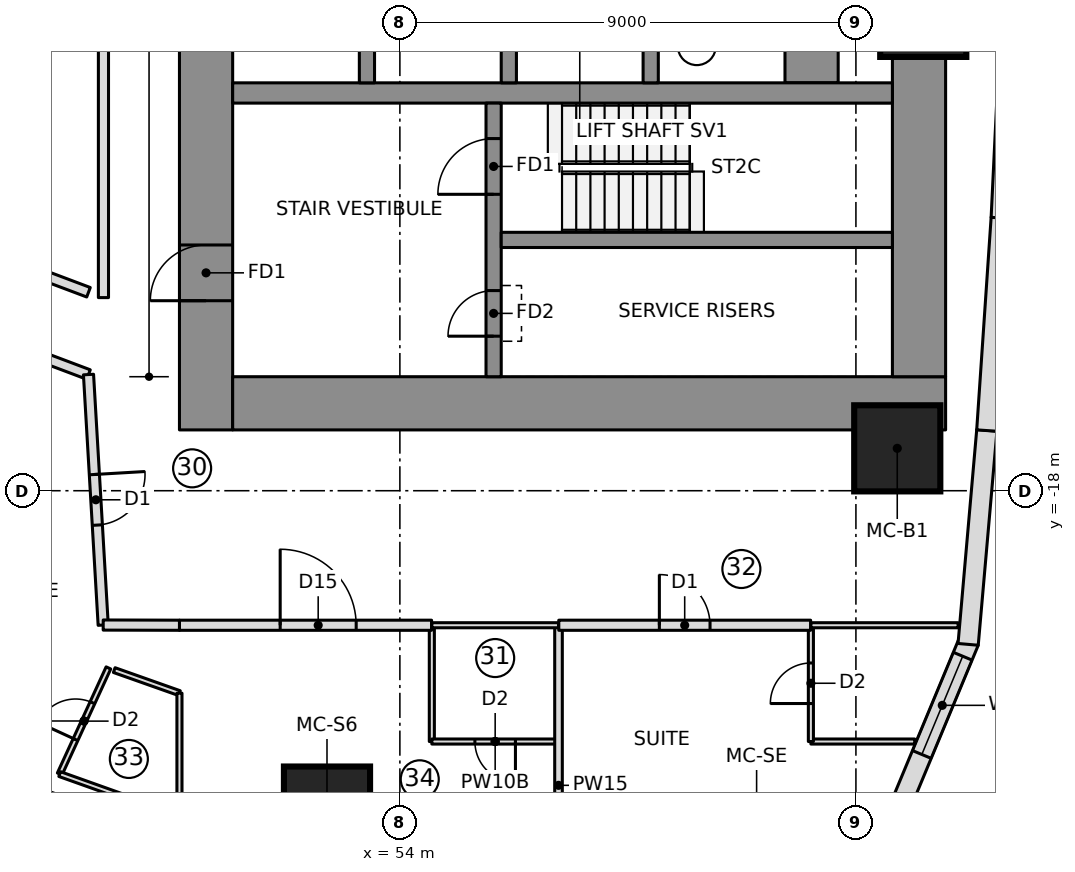
"""IFC4 building model, lengths in metres.
Left out: names, types, materials, properties, quantities, classifications, styles, units other than length and angle.
Written with IfcOpenShell. Run it as: python <this file> out.ifc"""

import sys

from ifc_helpers import new_model, si_unit, direction, frame, frame_2d, origin, origin_2d, place, context, subcontext, project, spatial, polyline, rectangle, outline, extrude, element, fill, save


model = new_model("IFC4")
c1 = context("Model", 3, precision=1e-05, world=origin(), true_north=direction((0.0, 1.0)))
c2 = subcontext(c1, "Body", "Model", "MODEL_VIEW")
j1 = project(units=[si_unit("LENGTHUNIT", "METRE"), si_unit("PLANEANGLEUNIT", "RADIAN")], contexts=[c1])
p1 = place(None, origin())
s1 = spatial("IfcSite", under=j1, at=p1, CompositionType="ELEMENT")
p2 = place(p1, origin())
s2 = spatial("IfcBuilding", under=s1, at=p2, CompositionType="ELEMENT")
p3 = place(p2, frame((0.0, 0.0, 113.3)))
s3 = spatial("IfcBuildingStorey", under=s2, at=p3, CompositionType="ELEMENT", Elevation=113.3)
p4 = place(p3, frame((50.175, -16.8, 0.0), z_axis=(0.0, 0.0, 1.0), x_axis=(0.0, 1.0, 0.0)))
e1 = element("IfcWall", 1, at=p4, inside=s3, PredefinedType="SHEAR", context=c2, shape_type="SweptSolid", body=[
    extrude(rectangle(XDim=10.15, YDim=1.05, at=frame_2d((5.075, 0.0))), origin(), (0.0, 0.0, 1.0), 3.55),
])
p5 = place(p4, frame((2.55, 0.0, 0.0)))
e2 = element("IfcOpeningElement", 2, at=p5, cuts=e1, PredefinedType="OPENING", context=c2, shape_type="SweptSolid", body=[
    extrude(rectangle(XDim=1.1, YDim=2.1, at=frame_2d((0.55, 1.05))), frame((0.0, 0.535, 0.0), z_axis=(0.0, -1.0, 0.0), x_axis=(1.0, 0.0, 0.0)), (0.0, 0.0, 1.0), 1.07),
])
p6 = place(p3, frame((50.7, -16.275, 0.0), z_axis=(0.0, 0.0, 1.0), x_axis=(1.0, 0.0, 0.0)))
e3 = element("IfcWall", 3, at=p6, inside=s3, PredefinedType="SHEAR", context=c2, shape_type="SweptSolid", body=[
    extrude(rectangle(XDim=14.07, YDim=1.05, at=frame_2d((7.035, 0.0))), origin(), (0.0, 0.0, 1.0), 3.55),
])
p7 = place(p3, frame((64.245, -15.75, 0.0), z_axis=(0.0, 0.0, 1.0), x_axis=(0.0, 1.0, 0.0)))
e4 = element("IfcWall", 4, at=p7, inside=s3, PredefinedType="SHEAR", context=c2, shape_type="SweptSolid", body=[
    extrude(rectangle(XDim=6.361, YDim=1.05, at=frame_2d((3.181, 0.0))), origin(), (0.0, 0.0, 1.0), 3.55),
])
p8 = place(p3, frame((62.125, -9.95, 0.0), z_axis=(0.0, 0.0, 1.0), x_axis=(0.0, 1.0, 0.0)))
e5 = element("IfcWall", 5, at=p8, inside=s3, PredefinedType="SHEAR", context=c2, shape_type="SweptSolid", body=[
    extrude(rectangle(XDim=19.9, YDim=1.05, at=frame_2d((9.95, 0.0))), origin(), (0.0, 0.0, 1.0), 3.55),
])
p9 = place(p3, frame((50.7, -10.15, 0.0), z_axis=(0.0, 0.0, 1.0), x_axis=(1.0, 0.0, 0.0)))
e6 = element("IfcWall", 6, at=p9, inside=s3, PredefinedType="SHEAR", context=c2, shape_type="SweptSolid", body=[
    extrude(rectangle(XDim=13.02, YDim=0.4, at=frame_2d((6.51, 0.0))), origin(), (0.0, 0.0, 1.0), 3.55),
])
for number, where, z_axis, x_axis in (
    (7, (53.35, -9.95, 0.0), (0.0, 0.0, 1.0), (0.0, 1.0, 0.0)),
    (8, (56.15, -9.95, 0.0), (0.0, 0.0, 1.0), (0.0, 1.0, 0.0)),
    (9, (58.95, -9.95, 0.0), (0.0, 0.0, 1.0), (0.0, 1.0, 0.0)),
):
    element("IfcWall", number, at=place(p3, frame(where, z_axis=z_axis, x_axis=x_axis)), inside=s3, PredefinedType="SHEAR", context=c2, shape_type="SweptSolid", body=[
        extrude(rectangle(XDim=3.0, YDim=0.3, at=frame_2d((1.5, 0.0))), origin(), (0.0, 0.0, 1.0), 3.55),
    ])
p10 = place(p3, frame((55.85, -15.75, 0.0), z_axis=(0.0, 0.0, 1.0), x_axis=(0.0, 1.0, 0.0)))
e10 = element("IfcWall", 10, at=p10, inside=s3, PredefinedType="SHEAR", context=c2, shape_type="SweptSolid", body=[
    extrude(rectangle(XDim=5.4, YDim=0.3, at=frame_2d((2.7, 0.0))), origin(), (0.0, 0.0, 1.0), 3.55),
])
p11 = place(p10, frame((3.6, 0.0, 0.0)))
e11 = element("IfcOpeningElement", 11, at=p11, cuts=e10, PredefinedType="OPENING", context=c2, shape_type="SweptSolid", body=[
    extrude(rectangle(XDim=1.1, YDim=2.1, at=frame_2d((0.55, 1.05))), frame((0.0, 0.16, 0.0), z_axis=(0.0, -1.0, 0.0), x_axis=(1.0, 0.0, 0.0)), (0.0, 0.0, 1.0), 0.32),
])
p12 = place(p10, frame((0.8, 0.0, 0.0)))
e12 = element("IfcOpeningElement", 12, at=p12, cuts=e10, PredefinedType="OPENING", context=c2, shape_type="SweptSolid", body=[
    extrude(rectangle(XDim=0.9, YDim=2.1, at=frame_2d((0.45, 1.05))), frame((0.0, 0.16, 0.0), z_axis=(0.0, -1.0, 0.0), x_axis=(1.0, 0.0, 0.0)), (0.0, 0.0, 1.0), 0.32),
])
p13 = place(p3, frame((56.0, -13.05, 0.0), z_axis=(0.0, 0.0, 1.0), x_axis=(1.0, 0.0, 0.0)))
e13 = element("IfcWall", 13, at=p13, inside=s3, PredefinedType="SHEAR", context=c2, shape_type="SweptSolid", body=[
    extrude(rectangle(XDim=7.72, YDim=0.3, at=frame_2d((3.86, 0.0))), origin(), (0.0, 0.0, 1.0), 3.55),
])
for number, where, z_axis, x_axis in (
    (14, (52.562, -24.293, 0.0), (0.0, 0.0, 1.0), (1.0, 0.0, 0.0)),
    (15, (63.816, -17.164, 0.0), (0.0, 0.0, 1.0), (1.0, 0.0, 0.0)),
    (16, (64.329, -8.589, 0.0), (0.0, 0.0, 1.0), (1.0, 0.0, 0.0)),
):
    element("IfcColumn", number, at=place(p3, frame(where, z_axis=z_axis, x_axis=x_axis)), inside=s3, PredefinedType="COLUMN", context=c2, shape_type="SweptSolid", body=[
        extrude(rectangle(XDim=1.7, YDim=1.7, at=origin_2d()), origin(), (0.0, 0.0, 1.0), 3.55),
    ])
p14 = place(p3, frame((63.59, -24.916, 0.0), z_axis=(0.0, 0.0, 1.0), x_axis=(0.383997751971, 0.923334027577, 0.0)))
e17 = element("IfcWall", 17, at=p14, inside=s3, PredefinedType="NOTDEFINED", context=c2, shape_type="SweptSolid", body=[
    extrude(outline(polyline([(-0.061, -0.2), (4.27, -0.2), (4.208, 0.2), (0.061, 0.2), (-0.061, -0.2)])), origin(), (0.0, 0.0, 1.0), 3.25),
])
p15 = place(p14, frame((1.852, 0.0, 0.6)))
e18 = element("IfcOpeningElement", 18, at=p15, cuts=e17, PredefinedType="OPENING", context=c2, shape_type="SweptSolid", body=[
    extrude(outline(polyline([(0.0, 1.4), (0.08, 1.802), (0.308, 2.142), (0.648, 2.37), (1.05, 2.45), (1.452, 2.37), (1.792, 2.142), (2.02, 1.802), (2.1, 1.4), (2.1, 1.05), (2.02, 0.648), (1.792, 0.308), (1.452, 0.08), (1.05, 0.0), (0.648, 0.08), (0.308, 0.308), (0.08, 0.648), (0.0, 1.05), (0.0, 1.4)])), frame((0.0, 0.21, 0.0), z_axis=(0.0, -1.0, 0.0), x_axis=(1.0, 0.0, 0.0)), (0.0, 0.0, 1.0), 0.42),
])
p16 = place(p3, frame((65.217, -21.002, 0.0), z_axis=(0.0, 0.0, 1.0), x_axis=(0.086992730434, 0.996208946382, 0.0)))
e19 = element("IfcWall", 19, at=p16, inside=s3, PredefinedType="NOTDEFINED", context=c2, shape_type="SweptSolid", body=[
    extrude(outline(polyline([(-0.031, -0.2), (4.209, -0.2), (4.205, 0.2), (0.031, 0.2), (-0.031, -0.2)])), origin(), (0.0, 0.0, 1.0), 3.25),
])
p17 = place(p3, frame((65.583, -16.811, 0.0), z_axis=(0.0, 0.0, 1.0), x_axis=(0.067724559895, 0.997704056315, 0.0)))
e20 = element("IfcWall", 20, at=p17, inside=s3, PredefinedType="NOTDEFINED", context=c2, shape_type="SweptSolid", body=[
    extrude(outline(polyline([(-0.002, -0.2), (4.209, -0.2), (4.205, 0.2), (0.002, 0.2), (-0.002, -0.2)])), origin(), (0.0, 0.0, 1.0), 3.25),
])
p18 = place(p3, frame((65.868, -12.614, 0.0), z_axis=(0.0, 0.0, 1.0), x_axis=(0.048342691508, 0.998830808585, 0.0)))
e21 = element("IfcWall", 21, at=p18, inside=s3, PredefinedType="NOTDEFINED", context=c2, shape_type="SweptSolid", body=[
    extrude(outline(polyline([(-0.002, -0.2), (4.209, -0.2), (4.205, 0.2), (0.002, 0.2), (-0.002, -0.2)])), origin(), (0.0, 0.0, 1.0), 3.25),
])
p19 = place(p3, frame((54.631, -22.95, 0.0), z_axis=(0.0, 0.0, 1.0), x_axis=(0.0, 1.0, 0.0)))
e22 = element("IfcWall", 22, at=p19, inside=s3, PredefinedType="PARTITIONING", context=c2, shape_type="SweptSolid", body=[
    extrude(rectangle(XDim=2.3, YDim=0.1, at=frame_2d((1.15, 0.0))), origin(), (0.0, 0.0, 1.0), 3.25),
])
p20 = place(p3, frame((57.131, -22.95, 0.0), z_axis=(0.0, 0.0, 1.0), x_axis=(-1.0, 0.0, 0.0)))
e23 = element("IfcWall", 23, at=p20, inside=s3, PredefinedType="PARTITIONING", context=c2, shape_type="SweptSolid", body=[
    extrude(rectangle(XDim=2.5, YDim=0.1, at=frame_2d((1.25, 0.0))), origin(), (0.0, 0.0, 1.0), 3.25),
])
p21 = place(p20, frame((0.85, 0.0, 0.0)))
e24 = element("IfcOpeningElement", 24, at=p21, cuts=e23, PredefinedType="OPENING", context=c2, shape_type="SweptSolid", body=[
    extrude(rectangle(XDim=0.8, YDim=2.1, at=frame_2d((0.4, 1.05))), frame((0.0, 0.06, 0.0), z_axis=(0.0, -1.0, 0.0), x_axis=(1.0, 0.0, 0.0)), (0.0, 0.0, 1.0), 0.12),
])
p22 = place(p3, frame((64.16, -22.95, 0.0), z_axis=(0.0, 0.0, 1.0), x_axis=(-1.0, 0.0, 0.0)))
e25 = element("IfcWall", 25, at=p22, inside=s3, PredefinedType="PARTITIONING", context=c2, shape_type="SweptSolid", body=[
    extrude(rectangle(XDim=2.049, YDim=0.1, at=frame_2d((1.025, 0.0))), origin(), (0.0, 0.0, 1.0), 3.25),
])
p23 = place(p3, frame((62.111, -22.95, 0.0), z_axis=(0.0, 0.0, 1.0), x_axis=(0.0, 1.0, 0.0)))
e26 = element("IfcWall", 26, at=p23, inside=s3, PredefinedType="PARTITIONING", context=c2, shape_type="SweptSolid", body=[
    extrude(rectangle(XDim=2.3, YDim=0.1, at=frame_2d((1.15, 0.0))), origin(), (0.0, 0.0, 1.0), 3.25),
])
p24 = place(p23, frame((0.75, 0.0, 0.0)))
e27 = element("IfcOpeningElement", 27, at=p24, cuts=e26, PredefinedType="OPENING", context=c2, shape_type="SweptSolid", body=[
    extrude(rectangle(XDim=0.8, YDim=2.1, at=frame_2d((0.4, 1.05))), frame((0.0, 0.06, 0.0), z_axis=(0.0, -1.0, 0.0), x_axis=(1.0, 0.0, 0.0)), (0.0, 0.0, 1.0), 0.12),
])
p25 = place(p3, frame((57.131, -26.979, 0.0), z_axis=(0.0, 0.0, 1.0), x_axis=(0.0, 1.0, 0.0)))
e28 = element("IfcWall", 28, at=p25, inside=s3, PredefinedType="PARTITIONING", context=c2, shape_type="SweptSolid", body=[
    extrude(rectangle(XDim=6.329, YDim=0.15, at=frame_2d((3.165, 0.0))), origin(), (0.0, 0.0, 1.0), 3.25),
])
p26 = place(p3, frame((48.363, -21.54, 0.0), z_axis=(0.0, 0.0, 1.0), x_axis=(0.942692856107, -0.333661773425, 0.0)))
e29 = element("IfcWall", 29, at=p26, inside=s3, PredefinedType="PARTITIONING", context=c2, shape_type="SweptSolid", body=[
    extrude(rectangle(XDim=1.365, YDim=0.1, at=frame_2d((0.683, 0.0))), origin(), (0.0, 0.0, 1.0), 3.25),
])
p27 = place(p3, frame((47.286, -23.592, 0.0), z_axis=(0.0, 0.0, 1.0), x_axis=(0.41749308293, 0.908680100864, 0.0)))
e30 = element("IfcWall", 30, at=p27, inside=s3, PredefinedType="PARTITIONING", context=c2, shape_type="SweptSolid", body=[
    extrude(rectangle(XDim=2.306, YDim=0.1, at=frame_2d((1.153, 0.0))), origin(), (0.0, 0.0, 1.0), 3.25),
])
p28 = place(p27, frame((0.75, 0.0, 0.0)))
e31 = element("IfcOpeningElement", 31, at=p28, cuts=e30, PredefinedType="OPENING", context=c2, shape_type="SweptSolid", body=[
    extrude(rectangle(XDim=0.8, YDim=2.1, at=frame_2d((0.4, 1.05))), frame((0.0, 0.06, 0.0), z_axis=(0.0, -1.0, 0.0), x_axis=(1.0, 0.0, 0.0)), (0.0, 0.0, 1.0), 0.12),
])
p29 = place(p3, frame((49.65, -20.655, 0.0), z_axis=(0.0, 0.0, 1.0), x_axis=(1.0, 0.0, 0.0)))
e32 = element("IfcWall", 32, at=p29, inside=s3, PredefinedType="PARTITIONING", context=c2, shape_type="SweptSolid", body=[
    extrude(rectangle(XDim=4.976, YDim=0.2, at=frame_2d((2.488, 0.0))), origin(), (0.0, 0.0, 1.0), 3.25),
])
p30 = place(p29, frame((1.988, 0.0, 0.0)))
e33 = element("IfcOpeningElement", 33, at=p30, cuts=e32, PredefinedType="OPENING", context=c2, shape_type="SweptSolid", body=[
    extrude(rectangle(XDim=1.5, YDim=2.1, at=frame_2d((0.75, 1.05))), frame((0.0, 0.11, 0.0), z_axis=(0.0, -1.0, 0.0), x_axis=(1.0, 0.0, 0.0)), (0.0, 0.0, 1.0), 0.22),
])
p31 = place(p3, frame((57.135, -20.655, 0.0), z_axis=(0.0, 0.0, 1.0), x_axis=(1.0, 0.0, 0.0)))
e34 = element("IfcWall", 34, at=p31, inside=s3, PredefinedType="PARTITIONING", context=c2, shape_type="SweptSolid", body=[
    extrude(rectangle(XDim=4.971, YDim=0.2, at=frame_2d((2.485, 0.0))), origin(), (0.0, 0.0, 1.0), 3.25),
])
p32 = place(p31, frame((1.985, 0.0, 0.0)))
e35 = element("IfcOpeningElement", 35, at=p32, cuts=e34, PredefinedType="OPENING", context=c2, shape_type="SweptSolid", body=[
    extrude(rectangle(XDim=1.0, YDim=2.1, at=frame_2d((0.5, 1.05))), frame((0.0, 0.11, 0.0), z_axis=(0.0, -1.0, 0.0), x_axis=(1.0, 0.0, 0.0)), (0.0, 0.0, 1.0), 0.22),
])
p33 = place(p3, frame((54.631, -20.655, 0.0), z_axis=(0.0, 0.0, 1.0), x_axis=(1.0, 0.0, 0.0)))
e36 = element("IfcWall", 36, at=p33, inside=s3, PredefinedType="PARTITIONING", context=c2, shape_type="SweptSolid", body=[
    extrude(rectangle(XDim=2.5, YDim=0.1, at=frame_2d((1.25, 0.0))), origin(), (0.0, 0.0, 1.0), 3.25),
])
p34 = place(p3, frame((62.111, -20.655, 0.0), z_axis=(0.0, 0.0, 1.0), x_axis=(1.0, 0.0, 0.0)))
e37 = element("IfcWall", 37, at=p34, inside=s3, PredefinedType="PARTITIONING", context=c2, shape_type="SweptSolid", body=[
    extrude(rectangle(XDim=2.906, YDim=0.1, at=frame_2d((1.453, 0.0))), origin(), (0.0, 0.0, 1.0), 3.25),
])
p35 = place(p3, frame((49.65, -21.996, 0.0), z_axis=(0.0, 0.0, 1.0), x_axis=(0.0, -1.0, 0.0)))
e38 = element("IfcWall", 38, at=p35, inside=s3, PredefinedType="PARTITIONING", context=c2, shape_type="SweptSolid", body=[
    extrude(rectangle(XDim=2.439, YDim=0.1, at=frame_2d((1.22, 0.0))), origin(), (0.0, 0.0, 1.0), 3.25),
])
p36 = place(p3, frame((49.65, -24.435, 0.0), z_axis=(0.0, 0.0, 1.0), x_axis=(-0.941933231826, 0.335800218555, 0.0)))
e39 = element("IfcWall", 39, at=p36, inside=s3, PredefinedType="PARTITIONING", context=c2, shape_type="SweptSolid", body=[
    extrude(rectangle(XDim=2.51, YDim=0.1, at=frame_2d((1.255, 0.0))), origin(), (0.0, 0.0, 1.0), 3.25),
])
p37 = place(p3, frame((46.924, -15.357, 0.0), z_axis=(0.0, 0.0, 1.0), x_axis=(0.935803526171, -0.35252199989, 0.0)))
e40 = element("IfcWall", 40, at=p37, inside=s3, PredefinedType="PARTITIONING", context=c2, shape_type="SweptSolid", body=[
    extrude(rectangle(XDim=0.995, YDim=0.2, at=frame_2d((0.497, 0.0))), origin(), (0.0, 0.0, 1.0), 3.25),
])
p38 = place(p3, frame((47.855, -14.083, 0.0), z_axis=(0.0, 0.0, 1.0), x_axis=(-0.935907269358, 0.352246480696, 0.0)))
e41 = element("IfcWall", 41, at=p38, inside=s3, PredefinedType="PARTITIONING", context=c2, shape_type="SweptSolid", body=[
    extrude(rectangle(XDim=1.239, YDim=0.2, at=frame_2d((0.619, 0.0))), origin(), (0.0, 0.0, 1.0), 3.25),
])
p39 = place(p3, frame((47.855, -15.707, 0.0), z_axis=(0.0, 0.0, 1.0), x_axis=(0.058568850083, -0.998283371493, 0.0)))
e42 = element("IfcWall", 42, at=p39, inside=s3, PredefinedType="PARTITIONING", context=c2, shape_type="SweptSolid", body=[
    extrude(rectangle(XDim=4.952, YDim=0.2, at=frame_2d((2.476, 0.0))), origin(), (0.0, 0.0, 1.0), 3.25),
])
p40 = place(p39, frame((1.976, 0.0, 0.0)))
e43 = element("IfcOpeningElement", 43, at=p40, cuts=e42, PredefinedType="OPENING", context=c2, shape_type="SweptSolid", body=[
    extrude(rectangle(XDim=1.0, YDim=2.1, at=frame_2d((0.5, 1.05))), frame((0.0, 0.11, 0.0), z_axis=(0.0, -1.0, 0.0), x_axis=(1.0, 0.0, 0.0)), (0.0, 0.0, 1.0), 0.22),
])
p41 = place(p3, frame((48.15, 14.189, 0.0), z_axis=(0.0, 0.0, 1.0), x_axis=(0.0, -1.0, 0.0)))
e44 = element("IfcWall", 44, at=p41, inside=s3, PredefinedType="PARTITIONING", context=c2, shape_type="SweptSolid", body=[
    extrude(rectangle(XDim=28.377, YDim=0.2, at=frame_2d((14.189, 0.0))), origin(), (0.0, 0.0, 1.0), 3.25),
])
p42 = place(p3, frame((48.145, -20.651, 0.0), z_axis=(0.0, 0.0, 1.0), x_axis=(0.999996196879, -0.002757938895, 0.0)))
e45 = element("IfcWall", 45, at=p42, inside=s3, PredefinedType="PARTITIONING", context=c2, shape_type="SweptSolid", body=[
    extrude(rectangle(XDim=1.505, YDim=0.2, at=frame_2d((0.752, 0.0))), origin(), (0.0, 0.0, 1.0), 3.25),
])
p43 = place(p15, origin())
e46 = element("IfcWindow", 46, at=p43, inside=s3, PartitioningType="SINGLE_PANEL", PredefinedType="WINDOW", context=c2, shape_type="SweptSolid", body=[
    extrude(outline(polyline([(0.0, 1.4), (0.08, 1.802), (0.308, 2.142), (0.648, 2.37), (1.05, 2.45), (1.452, 2.37), (1.792, 2.142), (2.02, 1.802), (2.1, 1.4), (2.1, 1.05), (2.02, 0.648), (1.792, 0.308), (1.452, 0.08), (1.05, 0.0), (0.648, 0.08), (0.308, 0.308), (0.08, 0.648), (0.0, 1.05), (0.0, 1.4)])), frame((0.0, 0.17, 0.0), z_axis=(0.0, -1.0, 0.0), x_axis=(1.0, 0.0, 0.0)), (0.0, 0.0, 1.0), 0.06),
])
fill(e18, e46)
p44 = place(p21, origin())
e47 = element("IfcDoor", 47, at=p44, inside=s3, OperationType="SINGLE_SWING_LEFT", PredefinedType="DOOR", context=c2, shape_type="SweptSolid", body=[
    extrude(rectangle(XDim=0.8, YDim=2.1, at=frame_2d((0.4, 1.05))), frame((0.0, 0.025, 0.0), z_axis=(0.0, -1.0, 0.0), x_axis=(1.0, 0.0, 0.0)), (0.0, 0.0, 1.0), 0.05),
])
fill(e24, e47)
p45 = place(p24, origin())
e48 = element("IfcDoor", 48, at=p45, inside=s3, OperationType="SINGLE_SWING_LEFT", PredefinedType="DOOR", context=c2, shape_type="SweptSolid", body=[
    extrude(rectangle(XDim=0.8, YDim=2.1, at=frame_2d((0.4, 1.05))), frame((0.0, 0.025, 0.0), z_axis=(0.0, -1.0, 0.0), x_axis=(1.0, 0.0, 0.0)), (0.0, 0.0, 1.0), 0.05),
])
fill(e27, e48)
p46 = place(p28, origin())
e49 = element("IfcDoor", 49, at=p46, inside=s3, OperationType="SINGLE_SWING_LEFT", PredefinedType="DOOR", context=c2, shape_type="SweptSolid", body=[
    extrude(rectangle(XDim=0.8, YDim=2.1, at=frame_2d((0.4, 1.05))), frame((0.0, 0.025, 0.0), z_axis=(0.0, -1.0, 0.0), x_axis=(1.0, 0.0, 0.0)), (0.0, 0.0, 1.0), 0.05),
])
fill(e31, e49)
p47 = place(p30, origin())
e50 = element("IfcDoor", 50, at=p47, inside=s3, OperationType="DOUBLE_DOOR_SINGLE_SWING", PredefinedType="DOOR", context=c2, shape_type="SweptSolid", body=[
    extrude(rectangle(XDim=1.5, YDim=2.1, at=frame_2d((0.75, 1.05))), frame((0.0, 0.025, 0.0), z_axis=(0.0, -1.0, 0.0), x_axis=(1.0, 0.0, 0.0)), (0.0, 0.0, 1.0), 0.05),
])
fill(e33, e50)
p48 = place(p32, origin())
e51 = element("IfcDoor", 51, at=p48, inside=s3, OperationType="SINGLE_SWING_LEFT", PredefinedType="DOOR", context=c2, shape_type="SweptSolid", body=[
    extrude(rectangle(XDim=1.0, YDim=2.1, at=frame_2d((0.5, 1.05))), frame((0.0, 0.025, 0.0), z_axis=(0.0, -1.0, 0.0), x_axis=(1.0, 0.0, 0.0)), (0.0, 0.0, 1.0), 0.05),
])
fill(e35, e51)
p49 = place(p40, origin())
e52 = element("IfcDoor", 52, at=p49, inside=s3, OperationType="SINGLE_SWING_LEFT", PredefinedType="DOOR", context=c2, shape_type="SweptSolid", body=[
    extrude(rectangle(XDim=1.0, YDim=2.1, at=frame_2d((0.5, 1.05))), frame((0.0, 0.025, 0.0), z_axis=(0.0, -1.0, 0.0), x_axis=(1.0, 0.0, 0.0)), (0.0, 0.0, 1.0), 0.05),
])
fill(e43, e52)
p50 = place(p11, origin())
e53 = element("IfcDoor", 53, at=p50, inside=s3, OperationType="SINGLE_SWING_RIGHT", PredefinedType="DOOR", context=c2, shape_type="SweptSolid", body=[
    extrude(rectangle(XDim=1.1, YDim=2.1, at=frame_2d((0.55, 1.05))), frame((0.0, 0.025, 0.0), z_axis=(0.0, -1.0, 0.0), x_axis=(1.0, 0.0, 0.0)), (0.0, 0.0, 1.0), 0.05),
])
fill(e11, e53)
p51 = place(p5, origin())
e54 = element("IfcDoor", 54, at=p51, inside=s3, OperationType="SINGLE_SWING_RIGHT", PredefinedType="DOOR", context=c2, shape_type="SweptSolid", body=[
    extrude(rectangle(XDim=1.1, YDim=2.1, at=frame_2d((0.55, 1.05))), frame((0.0, 0.025, 0.0), z_axis=(0.0, -1.0, 0.0), x_axis=(1.0, 0.0, 0.0)), (0.0, 0.0, 1.0), 0.05),
])
fill(e2, e54)
p52 = place(p12, origin())
e55 = element("IfcDoor", 55, at=p52, inside=s3, OperationType="SINGLE_SWING_LEFT", PredefinedType="DOOR", context=c2, shape_type="SweptSolid", body=[
    extrude(rectangle(XDim=0.9, YDim=2.1, at=frame_2d((0.45, 1.05))), frame((0.0, 0.025, 0.0), z_axis=(0.0, -1.0, 0.0), x_axis=(1.0, 0.0, 0.0)), (0.0, 0.0, 1.0), 0.05),
])
fill(e12, e55)
save(model, sys.argv[1])
